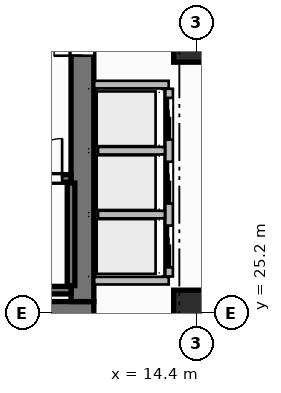
"""IFC4 building model, lengths in metres.
Left out: names, types, materials, properties, quantities, classifications, styles, units other than length and angle.
Written with IfcOpenShell. Run it as: python <this file> out.ifc"""

import sys

from ifc_helpers import new_model, si_unit, direction, frame, frame_2d, origin, origin_2d, place, context, subcontext, project, spatial, rectangle, extrude, source, transform, mapped, element, fill, save


model = new_model("IFC4")
c1 = context("Model", 3, precision=1e-05, world=origin(), true_north=direction((0.0, 1.0)))
c2 = subcontext(c1, "Body", "Model", "MODEL_VIEW")
j1 = project(units=[si_unit("LENGTHUNIT", "METRE"), si_unit("PLANEANGLEUNIT", "RADIAN")], contexts=[c1])
p1 = place(None, origin())
s1 = spatial("IfcSite", under=j1, at=p1, CompositionType="ELEMENT")
p2 = place(p1, origin())
s2 = spatial("IfcBuilding", under=s1, at=p2, CompositionType="ELEMENT")
p3 = place(p2, frame((0.0, 0.0, 16.2)))
s3 = spatial("IfcBuildingStorey", under=s2, at=p3, CompositionType="ELEMENT", Elevation=16.2)
p4 = place(p3, frame((3.3, 25.2, 0.0), z_axis=(0.0, 0.0, 1.0), x_axis=(1.0, 0.0, 0.0)))
e1 = element("IfcWall", 1, at=p4, inside=s3, PredefinedType="SHEAR", context=c2, shape_type="SweptSolid", body=[
    extrude(rectangle(XDim=8.4, YDim=0.6, at=frame_2d((4.2, 0.0))), origin(), (0.0, 0.0, 1.0), 5.4),
])
p5 = place(p3, frame((11.4, 25.5, 0.0), z_axis=(0.0, 0.0, 1.0), x_axis=(0.0, 1.0, 0.0)))
e2 = element("IfcWall", 2, at=p5, inside=s3, PredefinedType="SHEAR", context=c2, shape_type="SweptSolid", body=[
    extrude(rectangle(XDim=13.8, YDim=0.6, at=frame_2d((6.9, 0.0))), origin(), (0.0, 0.0, 1.0), 5.4),
])
p6 = place(p5, frame((6.47, 0.0, 0.0)))
e3 = element("IfcOpeningElement", 3, at=p6, cuts=e2, PredefinedType="OPENING", context=c2, shape_type="SweptSolid", body=[
    extrude(rectangle(XDim=1.5, YDim=2.2, at=frame_2d((0.75, 1.1))), frame((0.0, 0.31, 0.0), z_axis=(0.0, -1.0, 0.0), x_axis=(1.0, 0.0, 0.0)), (0.0, 0.0, 1.0), 0.62),
])
m1 = source(origin(), c2, "Body", "SweptSolid", [
    extrude(rectangle(XDim=1.2, YDim=1.2, at=origin_2d()), origin(), (0.0, 0.0, 1.0), 5.4),
])
for number, where, z_axis, x_axis in (
    (4, (14.4, 25.2, 0.0), (0.0, 0.0, 1.0), (1.0, 0.0, 0.0)),
    (5, (14.4, 32.4, 0.0), (0.0, 0.0, 1.0), (1.0, 0.0, 0.0)),
):
    element("IfcColumn", number, at=place(p3, frame(where, z_axis=z_axis, x_axis=x_axis)), inside=s3, PredefinedType="COLUMN", context=c2, shape_type="MappedRepresentation", body=[
        mapped(m1, transform((0.0, 0.0, 0.0), scale=1.0)),
    ])
p7 = place(p3, frame((4.0, 25.8, 0.0), z_axis=(0.0, 0.0, 1.0), x_axis=(1.0, 0.0, 0.0)))
e6 = element("IfcWall", 6, at=p7, inside=s3, PredefinedType="SHEAR", context=c2, shape_type="SweptSolid", body=[
    extrude(rectangle(XDim=7.1, YDim=0.2, at=frame_2d((3.55, 0.0))), origin(), (0.0, 0.0, 1.0), 5.4),
])
p8 = place(p3, frame((11.1, 25.92, 0.0), z_axis=(0.0, 0.0, 1.0), x_axis=(0.0, 1.0, 0.0)))
e7 = element("IfcWall", 7, at=p8, inside=s3, PredefinedType="SHEAR", context=c2, shape_type="SweptSolid", body=[
    extrude(rectangle(XDim=2.7, YDim=0.2, at=frame_2d((1.35, 0.0))), origin(), (0.0, 0.0, 1.0), 5.4),
])
p9 = place(p3, frame((4.0, 28.74, 0.0), z_axis=(0.0, 0.0, 1.0), x_axis=(1.0, 0.0, 0.0)))
e8 = element("IfcWall", 8, at=p9, inside=s3, PredefinedType="SHEAR", context=c2, shape_type="SweptSolid", body=[
    extrude(rectangle(XDim=7.1, YDim=0.2, at=frame_2d((3.55, 0.0))), origin(), (0.0, 0.0, 1.0), 5.4),
])
p10 = place(p9, frame((5.815, 0.0, 0.0)))
e9 = element("IfcOpeningElement", 9, at=p10, cuts=e8, PredefinedType="OPENING", context=c2, shape_type="SweptSolid", body=[
    extrude(rectangle(XDim=1.05, YDim=2.2, at=frame_2d((0.525, 1.1))), frame((0.0, 0.11, 0.0), z_axis=(0.0, -1.0, 0.0), x_axis=(1.0, 0.0, 0.0)), (0.0, 0.0, 1.0), 0.22),
])
for number, where, z_axis, x_axis in (
    (10, (11.71, 26.05, 0.0), (0.0, 0.0, 1.0), (1.0, 0.0, 0.0)),
    (11, (11.71, 31.21, 0.0), (0.0, 0.0, 1.0), (1.0, 0.0, 0.0)),
):
    element("IfcWall", number, at=place(p3, frame(where, z_axis=z_axis, x_axis=x_axis)), inside=s3, PredefinedType="PARTITIONING", context=c2, shape_type="SweptSolid", body=[
        extrude(rectangle(XDim=1.96, YDim=0.2, at=frame_2d((0.98, 0.0))), origin(), (0.0, 0.0, 1.0), 5.1),
    ])
p11 = place(p3, frame((13.68, 26.16, 0.0), z_axis=(0.0, 0.0, 1.0), x_axis=(0.0, 1.0, 0.0)))
e12 = element("IfcWall", 12, at=p11, inside=s3, PredefinedType="PARTITIONING", context=c2, shape_type="SweptSolid", body=[
    extrude(rectangle(XDim=4.94, YDim=0.2, at=frame_2d((2.47, 0.0))), origin(), (0.0, 0.0, 1.0), 5.1),
])
p12 = place(p11, frame((0.24, 0.0, 0.0)))
e13 = element("IfcOpeningElement", 13, at=p12, cuts=e12, PredefinedType="OPENING", context=c2, shape_type="SweptSolid", body=[
    extrude(rectangle(XDim=1.1, YDim=2.2, at=frame_2d((0.55, 1.1))), frame((0.0, 0.11, 0.0), z_axis=(0.0, -1.0, 0.0), x_axis=(1.0, 0.0, 0.0)), (0.0, 0.0, 1.0), 0.22),
])
p13 = place(p11, frame((1.92, 0.0, 0.0)))
e14 = element("IfcOpeningElement", 14, at=p13, cuts=e12, PredefinedType="OPENING", context=c2, shape_type="SweptSolid", body=[
    extrude(rectangle(XDim=1.1, YDim=2.2, at=frame_2d((0.55, 1.1))), frame((0.0, 0.11, 0.0), z_axis=(0.0, -1.0, 0.0), x_axis=(1.0, 0.0, 0.0)), (0.0, 0.0, 1.0), 0.22),
])
p14 = place(p11, frame((3.6, 0.0, 0.0)))
e15 = element("IfcOpeningElement", 15, at=p14, cuts=e12, PredefinedType="OPENING", context=c2, shape_type="SweptSolid", body=[
    extrude(rectangle(XDim=1.1, YDim=2.2, at=frame_2d((0.55, 1.1))), frame((0.0, 0.11, 0.0), z_axis=(0.0, -1.0, 0.0), x_axis=(1.0, 0.0, 0.0)), (0.0, 0.0, 1.0), 0.22),
])
for number, where, z_axis, x_axis in (
    (16, (11.81, 27.79, 0.0), (0.0, 0.0, 1.0), (1.0, 0.0, 0.0)),
    (17, (11.81, 29.47, 0.0), (0.0, 0.0, 1.0), (1.0, 0.0, 0.0)),
):
    element("IfcWall", number, at=place(p3, frame(where, z_axis=z_axis, x_axis=x_axis)), inside=s3, PredefinedType="PARTITIONING", context=c2, shape_type="SweptSolid", body=[
        extrude(rectangle(XDim=1.76, YDim=0.2, at=frame_2d((0.88, 0.0))), origin(), (0.0, 0.0, 1.0), 5.1),
    ])
m2 = source(origin(), c2, "Body", "SweptSolid", [
    extrude(rectangle(XDim=1.05, YDim=2.2, at=frame_2d((0.525, 1.1))), frame((0.0, 0.025, 0.0), z_axis=(0.0, -1.0, 0.0), x_axis=(1.0, 0.0, 0.0)), (0.0, 0.0, 1.0), 0.05),
])
p15 = place(p10, origin())
e18 = element("IfcDoor", 18, at=p15, inside=s3, OperationType="SINGLE_SWING_RIGHT", PredefinedType="DOOR", context=c2, shape_type="MappedRepresentation", body=[
    mapped(m2, transform((0.0, 0.0, 0.0), scale=1.0)),
])
fill(e9, e18)
m3 = source(origin(), c2, "Body", "SweptSolid", [
    extrude(rectangle(XDim=1.5, YDim=2.2, at=frame_2d((0.75, 1.1))), frame((0.0, 0.025, 0.0), z_axis=(0.0, -1.0, 0.0), x_axis=(1.0, 0.0, 0.0)), (0.0, 0.0, 1.0), 0.05),
])
p16 = place(p6, origin())
e19 = element("IfcDoor", 19, at=p16, inside=s3, OperationType="DOUBLE_DOOR_SINGLE_SWING", PredefinedType="DOOR", context=c2, shape_type="MappedRepresentation", body=[
    mapped(m3, transform((0.0, 0.0, 0.0), scale=1.0)),
])
fill(e3, e19)
m4 = source(origin(), c2, "Body", "SweptSolid", [
    extrude(rectangle(XDim=1.1, YDim=2.2, at=frame_2d((0.55, 1.1))), frame((0.0, 0.025, 0.0), z_axis=(0.0, -1.0, 0.0), x_axis=(1.0, 0.0, 0.0)), (0.0, 0.0, 1.0), 0.05),
])
p17 = place(p12, origin())
e20 = element("IfcDoor", 20, at=p17, inside=s3, OperationType="SLIDING_TO_LEFT", PredefinedType="DOOR", context=c2, shape_type="MappedRepresentation", body=[
    mapped(m4, transform((0.0, 0.0, 0.0), scale=1.0)),
])
fill(e13, e20)
p18 = place(p13, origin())
e21 = element("IfcDoor", 21, at=p18, inside=s3, OperationType="SLIDING_TO_LEFT", PredefinedType="DOOR", context=c2, shape_type="MappedRepresentation", body=[
    mapped(m4, transform((0.0, 0.0, 0.0), scale=1.0)),
])
fill(e14, e21)
p19 = place(p14, origin())
e22 = element("IfcDoor", 22, at=p19, inside=s3, OperationType="SLIDING_TO_LEFT", PredefinedType="DOOR", context=c2, shape_type="MappedRepresentation", body=[
    mapped(m4, transform((0.0, 0.0, 0.0), scale=1.0)),
])
fill(e15, e22)
save(model, sys.argv[1])
